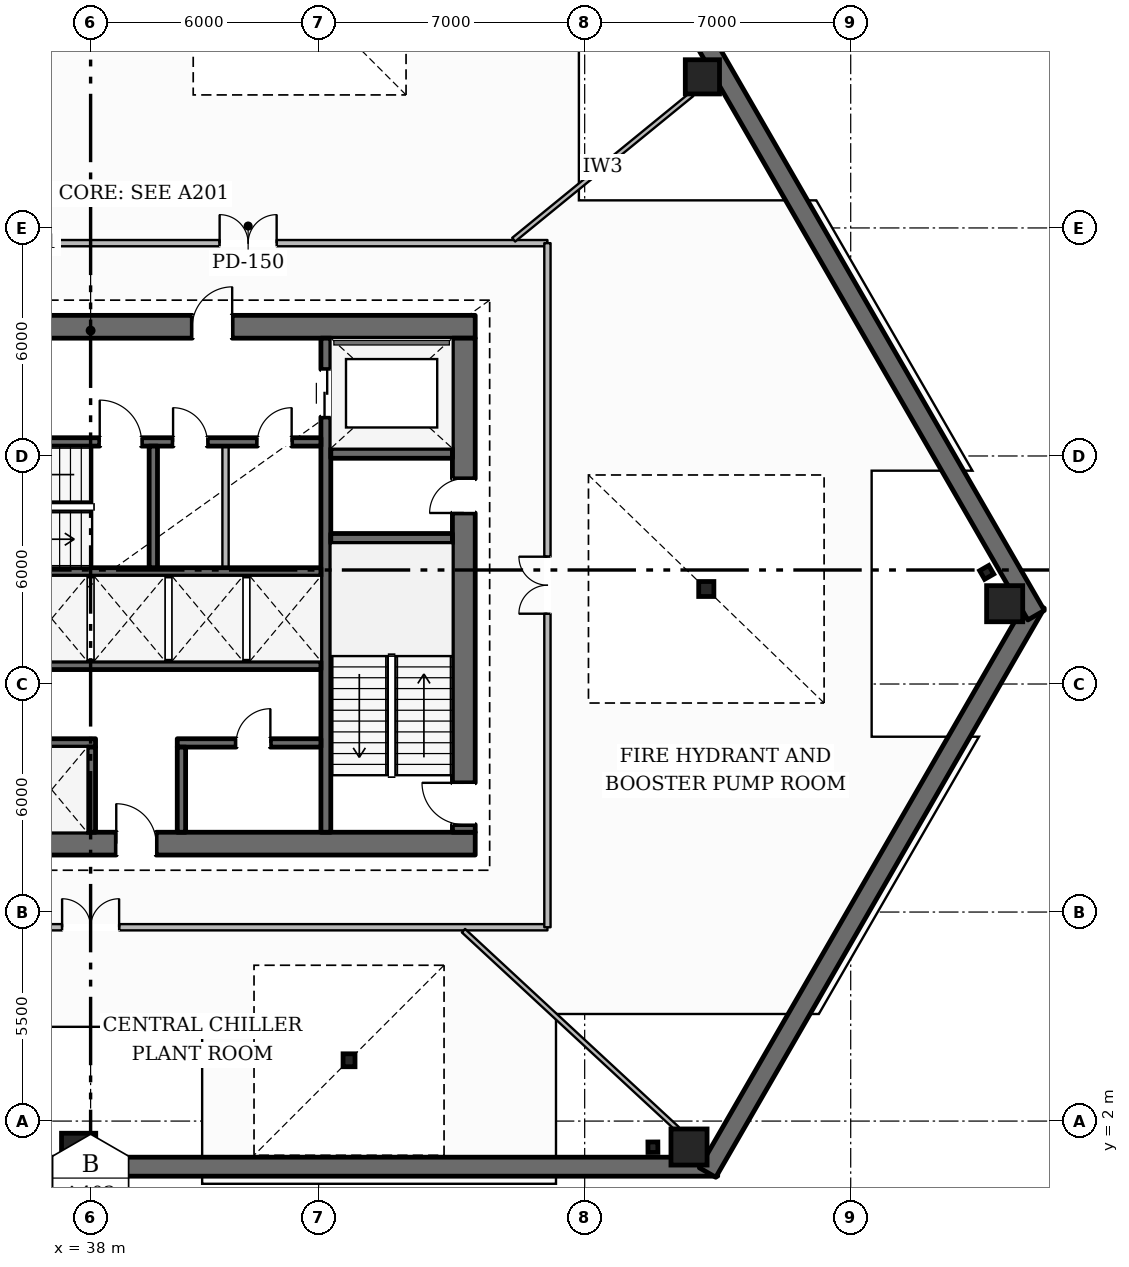
"""IFC4 building model, lengths in metres.
Left out: names, types, materials, properties, quantities, classifications, styles, units other than length and angle.
Written with IfcOpenShell. Run it as: python <this file> out.ifc"""

import sys

from ifc_helpers import new_model, si_unit, direction, frame, frame_2d, origin, origin_2d, place, context, subcontext, project, spatial, rectangle, hollow_rectangle, i_section, extrude, element, fill, save


model = new_model("IFC4")
c1 = context("Model", 3, precision=1e-05, world=origin(), true_north=direction((0.0, 1.0)))
c2 = subcontext(c1, "Body", "Model", "MODEL_VIEW")
j1 = project(units=[si_unit("LENGTHUNIT", "METRE"), si_unit("PLANEANGLEUNIT", "RADIAN")], contexts=[c1])
p1 = place(None, origin())
s1 = spatial("IfcSite", under=j1, at=p1, CompositionType="ELEMENT")
p2 = place(p1, origin())
s2 = spatial("IfcBuilding", under=s1, at=p2, CompositionType="ELEMENT")
p3 = place(p2, frame((0.0, 0.0, -8.4)))
s3 = spatial("IfcBuildingStorey", under=s2, at=p3, CompositionType="ELEMENT", Elevation=-8.4)
p4 = place(p3, frame((21.5, 0.8, 0.0), z_axis=(0.0, 0.0, 1.0), x_axis=(1.0, 0.0, 0.0)))
e1 = element("IfcWall", 1, at=p4, inside=s3, PredefinedType="SHEAR", context=c2, shape_type="SweptSolid", body=[
    extrude(rectangle(XDim=33.0, YDim=0.5, at=frame_2d((16.5, 0.0))), origin(), (0.0, 0.0, 1.0), 3.95),
])
p5 = place(p3, frame((54.233, 0.646, 0.0), z_axis=(0.0, 0.0, 1.0), x_axis=(0.499998305863, 0.866026381893, 0.0)))
e2 = element("IfcWall", 2, at=p5, inside=s3, PredefinedType="SHEAR", context=c2, shape_type="SweptSolid", body=[
    extrude(rectangle(XDim=17.289, YDim=0.5, at=frame_2d((8.644, 0.0))), origin(), (0.0, 0.0, 1.0), 3.95),
])
p6 = place(p3, frame((62.878, 15.311, 0.0), z_axis=(0.0, 0.0, 1.0), x_axis=(-0.499999749417, 0.866025548458, 0.0)))
e3 = element("IfcWall", 3, at=p6, inside=s3, PredefinedType="SHEAR", context=c2, shape_type="SweptSolid", body=[
    extrude(rectangle(XDim=33.0, YDim=0.5, at=frame_2d((16.5, 0.0))), origin(), (0.0, 0.0, 1.0), 3.95),
])
p7 = place(p3, frame((27.88, 9.3, 0.0), z_axis=(0.0, 0.0, 1.0), x_axis=(1.0, 0.0, 0.0)))
e4 = element("IfcWall", 4, at=p7, inside=s3, PredefinedType="SOLIDWALL", context=c2, shape_type="SweptSolid", body=[
    extrude(rectangle(XDim=20.24, YDim=0.6, at=frame_2d((10.12, 0.0))), origin(), (0.0, 0.0, 1.0), 3.95),
])
p8 = place(p7, frame((10.795, 0.0, 0.0)))
e5 = element("IfcOpeningElement", 5, at=p8, cuts=e4, PredefinedType="OPENING", context=c2, shape_type="SweptSolid", body=[
    extrude(rectangle(XDim=1.05, YDim=2.15, at=frame_2d((0.525, 1.075))), frame((0.0, 0.31, 0.0), z_axis=(0.0, -1.0, 0.0), x_axis=(1.0, 0.0, 0.0)), (0.0, 0.0, 1.0), 0.62),
])
p9 = place(p3, frame((27.88, 22.9, 0.0), z_axis=(0.0, 0.0, 1.0), x_axis=(1.0, 0.0, 0.0)))
e6 = element("IfcWall", 6, at=p9, inside=s3, PredefinedType="SOLIDWALL", context=c2, shape_type="SweptSolid", body=[
    extrude(rectangle(XDim=20.24, YDim=0.6, at=frame_2d((10.12, 0.0))), origin(), (0.0, 0.0, 1.0), 3.95),
])
p10 = place(p9, frame((6.395, 0.0, 0.0)))
e7 = element("IfcOpeningElement", 7, at=p10, cuts=e6, PredefinedType="OPENING", context=c2, shape_type="SweptSolid", body=[
    extrude(rectangle(XDim=1.05, YDim=2.15, at=frame_2d((0.525, 1.075))), frame((0.0, 0.31, 0.0), z_axis=(0.0, -1.0, 0.0), x_axis=(1.0, 0.0, 0.0)), (0.0, 0.0, 1.0), 0.62),
])
p11 = place(p9, frame((12.795, 0.0, 0.0)))
e8 = element("IfcOpeningElement", 8, at=p11, cuts=e6, PredefinedType="OPENING", context=c2, shape_type="SweptSolid", body=[
    extrude(rectangle(XDim=1.05, YDim=2.15, at=frame_2d((0.525, 1.075))), frame((0.0, 0.31, 0.0), z_axis=(0.0, -1.0, 0.0), x_axis=(1.0, 0.0, 0.0)), (0.0, 0.0, 1.0), 0.62),
])
p12 = place(p3, frame((47.82, 9.6, 0.0), z_axis=(0.0, 0.0, 1.0), x_axis=(0.0, 1.0, 0.0)))
e9 = element("IfcWall", 9, at=p12, inside=s3, PredefinedType="SOLIDWALL", context=c2, shape_type="SweptSolid", body=[
    extrude(rectangle(XDim=13.0, YDim=0.6, at=frame_2d((6.5, 0.0))), origin(), (0.0, 0.0, 1.0), 3.95),
])
p13 = place(p12, frame((0.2, 0.0, 0.0)))
e10 = element("IfcOpeningElement", 10, at=p13, cuts=e9, PredefinedType="OPENING", context=c2, shape_type="SweptSolid", body=[
    extrude(rectangle(XDim=1.1, YDim=2.15, at=frame_2d((0.55, 1.075))), frame((0.0, 0.31, 0.0), z_axis=(0.0, -1.0, 0.0), x_axis=(1.0, 0.0, 0.0)), (0.0, 0.0, 1.0), 0.62),
])
p14 = place(p12, frame((8.4, 0.0, 0.0)))
e11 = element("IfcOpeningElement", 11, at=p14, cuts=e9, PredefinedType="OPENING", context=c2, shape_type="SweptSolid", body=[
    extrude(rectangle(XDim=0.9, YDim=2.1, at=frame_2d((0.45, 1.05))), frame((0.0, 0.31, 0.0), z_axis=(0.0, -1.0, 0.0), x_axis=(1.0, 0.0, 0.0)), (0.0, 0.0, 1.0), 0.62),
])
p15 = place(p3, frame((44.19, 9.6, 0.0), z_axis=(0.0, 0.0, 1.0), x_axis=(0.0, 1.0, 0.0)))
e12 = element("IfcWall", 12, at=p15, inside=s3, PredefinedType="SHEAR", context=c2, shape_type="SweptSolid", body=[
    extrude(rectangle(XDim=13.0, YDim=0.26, at=frame_2d((6.5, 0.0))), origin(), (0.0, 0.0, 1.0), 3.95),
])
p16 = place(p15, frame((10.925, 0.0, 0.0)))
e13 = element("IfcOpeningElement", 13, at=p16, cuts=e12, PredefinedType="OPENING", context=c2, shape_type="SweptSolid", body=[
    extrude(rectangle(XDim=1.25, YDim=2.25, at=frame_2d((0.625, 1.125))), frame((0.0, 0.14, 0.0), z_axis=(0.0, -1.0, 0.0), x_axis=(1.0, 0.0, 0.0)), (0.0, 0.0, 1.0), 0.28),
])
for number, where, z_axis, x_axis in (
    (14, (44.32, 17.33, 0.0), (0.0, 0.0, 1.0), (1.0, 0.0, 0.0)),
    (15, (44.32, 19.57, 0.0), (0.0, 0.0, 1.0), (1.0, 0.0, 0.0)),
):
    element("IfcWall", number, at=place(p3, frame(where, z_axis=z_axis, x_axis=x_axis)), inside=s3, PredefinedType="SHEAR", context=c2, shape_type="SweptSolid", body=[
        extrude(rectangle(XDim=3.2, YDim=0.26, at=frame_2d((1.6, 0.0))), origin(), (0.0, 0.0, 1.0), 3.95),
    ])
p17 = place(p3, frame((31.94, 19.87, 0.0), z_axis=(0.0, 0.0, 1.0), x_axis=(1.0, 0.0, 0.0)))
e16 = element("IfcWall", 16, at=p17, inside=s3, PredefinedType="SOLIDWALL", context=c2, shape_type="SweptSolid", body=[
    extrude(rectangle(XDim=12.12, YDim=0.22, at=frame_2d((6.06, 0.0))), origin(), (0.0, 0.0, 1.0), 3.95),
])
p18 = place(p17, frame((6.3, 0.0, 0.0)))
e17 = element("IfcOpeningElement", 17, at=p18, cuts=e16, PredefinedType="OPENING", context=c2, shape_type="SweptSolid", body=[
    extrude(rectangle(XDim=1.1, YDim=2.15, at=frame_2d((0.55, 1.075))), frame((0.0, 0.12, 0.0), z_axis=(0.0, -1.0, 0.0), x_axis=(1.0, 0.0, 0.0)), (0.0, 0.0, 1.0), 0.24),
])
p19 = place(p17, frame((8.23, 0.0, 0.0)))
e18 = element("IfcOpeningElement", 18, at=p19, cuts=e16, PredefinedType="OPENING", context=c2, shape_type="SweptSolid", body=[
    extrude(rectangle(XDim=0.9, YDim=2.1, at=frame_2d((0.45, 1.05))), frame((0.0, 0.12, 0.0), z_axis=(0.0, -1.0, 0.0), x_axis=(1.0, 0.0, 0.0)), (0.0, 0.0, 1.0), 0.24),
])
p20 = place(p17, frame((10.45, 0.0, 0.0)))
e19 = element("IfcOpeningElement", 19, at=p20, cuts=e16, PredefinedType="OPENING", context=c2, shape_type="SweptSolid", body=[
    extrude(rectangle(XDim=0.9, YDim=2.1, at=frame_2d((0.45, 1.05))), frame((0.0, 0.12, 0.0), z_axis=(0.0, -1.0, 0.0), x_axis=(1.0, 0.0, 0.0)), (0.0, 0.0, 1.0), 0.24),
])
p21 = place(p3, frame((31.94, 16.45, 0.0), z_axis=(0.0, 0.0, 1.0), x_axis=(1.0, 0.0, 0.0)))
e20 = element("IfcWall", 20, at=p21, inside=s3, PredefinedType="SOLIDWALL", context=c2, shape_type="SweptSolid", body=[
    extrude(rectangle(XDim=12.12, YDim=0.22, at=frame_2d((6.06, 0.0))), origin(), (0.0, 0.0, 1.0), 3.95),
])
p22 = place(p3, frame((39.65, 16.56, 0.0), z_axis=(0.0, 0.0, 1.0), x_axis=(0.0, 1.0, 0.0)))
e21 = element("IfcWall", 21, at=p22, inside=s3, PredefinedType="SOLIDWALL", context=c2, shape_type="SweptSolid", body=[
    extrude(rectangle(XDim=3.2, YDim=0.22, at=frame_2d((1.6, 0.0))), origin(), (0.0, 0.0, 1.0), 3.95),
])
p23 = place(p3, frame((31.94, 13.99, 0.0), z_axis=(0.0, 0.0, 1.0), x_axis=(1.0, 0.0, 0.0)))
e22 = element("IfcWall", 22, at=p23, inside=s3, PredefinedType="SOLIDWALL", context=c2, shape_type="SweptSolid", body=[
    extrude(rectangle(XDim=12.12, YDim=0.22, at=frame_2d((6.06, 0.0))), origin(), (0.0, 0.0, 1.0), 3.95),
])
p24 = place(p23, frame((2.61, 0.0, 0.0)))
e23 = element("IfcOpeningElement", 23, at=p24, cuts=e22, PredefinedType="OPENING", context=c2, shape_type="SweptSolid", body=[
    extrude(rectangle(XDim=0.9, YDim=2.1, at=frame_2d((0.45, 1.05))), frame((0.0, 0.12, 0.0), z_axis=(0.0, -1.0, 0.0), x_axis=(1.0, 0.0, 0.0)), (0.0, 0.0, 1.0), 0.24),
])
p25 = place(p3, frame((31.94, 11.95, 0.0), z_axis=(0.0, 0.0, 1.0), x_axis=(1.0, 0.0, 0.0)))
e24 = element("IfcWall", 24, at=p25, inside=s3, PredefinedType="SOLIDWALL", context=c2, shape_type="SweptSolid", body=[
    extrude(rectangle(XDim=6.19, YDim=0.22, at=frame_2d((3.095, 0.0))), origin(), (0.0, 0.0, 1.0), 3.95),
])
p26 = place(p25, frame((2.51, 0.0, 0.0)))
e25 = element("IfcOpeningElement", 25, at=p26, cuts=e24, PredefinedType="OPENING", context=c2, shape_type="SweptSolid", body=[
    extrude(rectangle(XDim=0.9, YDim=2.1, at=frame_2d((0.45, 1.05))), frame((0.0, 0.12, 0.0), z_axis=(0.0, -1.0, 0.0), x_axis=(1.0, 0.0, 0.0)), (0.0, 0.0, 1.0), 0.24),
])
p27 = place(p3, frame((40.28, 11.95, 0.0), z_axis=(0.0, 0.0, 1.0), x_axis=(1.0, 0.0, 0.0)))
e26 = element("IfcWall", 26, at=p27, inside=s3, PredefinedType="SOLIDWALL", context=c2, shape_type="SweptSolid", body=[
    extrude(rectangle(XDim=3.78, YDim=0.22, at=frame_2d((1.89, 0.0))), origin(), (0.0, 0.0, 1.0), 3.95),
])
p28 = place(p27, frame((1.55, 0.0, 0.0)))
e27 = element("IfcOpeningElement", 27, at=p28, cuts=e26, PredefinedType="OPENING", context=c2, shape_type="SweptSolid", body=[
    extrude(rectangle(XDim=0.9, YDim=2.1, at=frame_2d((0.45, 1.05))), frame((0.0, 0.12, 0.0), z_axis=(0.0, -1.0, 0.0), x_axis=(1.0, 0.0, 0.0)), (0.0, 0.0, 1.0), 0.24),
])
for number, where, z_axis, x_axis in (
    (28, (38.02, 9.6, 0.0), (0.0, 0.0, 1.0), (0.0, 1.0, 0.0)),
    (29, (40.39, 9.6, 0.0), (0.0, 0.0, 1.0), (0.0, 1.0, 0.0)),
):
    element("IfcWall", number, at=place(p3, frame(where, z_axis=z_axis, x_axis=x_axis)), inside=s3, PredefinedType="SOLIDWALL", context=c2, shape_type="SweptSolid", body=[
        extrude(rectangle(XDim=2.24, YDim=0.22, at=frame_2d((1.12, 0.0))), origin(), (0.0, 0.0, 1.0), 3.95),
    ])
for number, where, z_axis, x_axis in (
    (30, (53.746, 1.318, 0.0), (0.0, 0.0, 1.0), (1.0, 0.0, 0.0)),
    (31, (62.051, 15.613, 0.0), (0.0, 0.0, 1.0), (1.0, 0.0, 0.0)),
):
    element("IfcColumn", number, at=place(p3, frame(where, z_axis=z_axis, x_axis=x_axis)), inside=s3, PredefinedType="COLUMN", context=c2, shape_type="SweptSolid", body=[
        extrude(hollow_rectangle(XDim=0.95, YDim=0.95, WallThickness=0.04, at=origin_2d()), origin(), (0.0, 0.0, 1.0), 3.95),
    ])
for number, where, z_axis, x_axis in (
    (32, (37.685, 1.23, 0.0), (0.0, 0.0, 1.0), (1.0, 0.0, 0.0)),
    (33, (54.098, 29.476, 0.0), (0.0, 0.0, 1.0), (1.0, 0.0, 0.0)),
):
    element("IfcColumn", number, at=place(p3, frame(where, z_axis=z_axis, x_axis=x_axis)), inside=s3, PredefinedType="COLUMN", context=c2, shape_type="SweptSolid", body=[
        extrude(hollow_rectangle(XDim=0.9, YDim=0.9, WallThickness=0.038, at=origin_2d()), origin(), (0.0, 0.0, 1.0), 3.95),
    ])
for number, where, z_axis, x_axis in (
    (34, (52.795, 1.312, 0.0), (0.0, 0.0, 1.0), (1.0, 0.005, 0.0)),
    (35, (61.578, 16.437, 0.0), (0.0, 0.0, 1.0), (-0.498, 0.867, 0.0)),
):
    element("IfcColumn", number, at=place(p3, frame(where, z_axis=z_axis, x_axis=x_axis)), inside=s3, PredefinedType="PILASTER", context=c2, shape_type="SweptSolid", body=[
        extrude(i_section(OverallWidth=0.261, OverallDepth=0.276, WebThickness=0.015, FlangeThickness=0.025, at=origin_2d()), origin(), (0.0, 0.0, 1.0), 3.95),
    ])
p29 = place(p3, frame((54.2, 16.0, 0.0), z_axis=(0.0, 0.0, 1.0), x_axis=(1.0, 0.0, 0.0)))
e36 = element("IfcColumn", 36, at=p29, inside=s3, PredefinedType="COLUMN", context=c2, shape_type="SweptSolid", body=[
    extrude(i_section(OverallWidth=0.399, OverallDepth=0.394, WebThickness=0.023, FlangeThickness=0.037, at=origin_2d()), origin(), (0.0, 0.0, 1.0), 3.95),
])
p30 = place(p3, frame((44.8, 3.6, 0.0), z_axis=(0.0, 0.0, 1.0), x_axis=(1.0, 0.0, 0.0)))
e37 = element("IfcColumn", 37, at=p30, inside=s3, PredefinedType="COLUMN", context=c2, shape_type="SweptSolid", body=[
    extrude(i_section(OverallWidth=0.314, OverallDepth=0.34, WebThickness=0.019, FlangeThickness=0.031, at=origin_2d()), origin(), (0.0, 0.0, 1.0), 3.95),
])
p31 = place(p3, frame((41.55, 16.56, 0.0), z_axis=(0.0, 0.0, 1.0), x_axis=(0.0, 1.0, 0.0)))
e38 = element("IfcWall", 38, at=p31, inside=s3, PredefinedType="PARTITIONING", context=c2, shape_type="SweptSolid", body=[
    extrude(rectangle(XDim=3.2, YDim=0.165, at=frame_2d((1.6, 0.0))), origin(), (0.0, 0.0, 1.0), 3.95),
])
p32 = place(p3, frame((25.98, 25.1, 0.0), z_axis=(0.0, 0.0, 1.0), x_axis=(1.0, 0.0, 0.0)))
e39 = element("IfcWall", 39, at=p32, inside=s3, PredefinedType="PARTITIONING", context=c2, shape_type="SweptSolid", body=[
    extrude(rectangle(XDim=24.04, YDim=0.165, at=frame_2d((12.02, 0.0))), origin(), (0.0, 0.0, 1.0), 3.95),
])
p33 = place(p32, frame((15.415, 0.0, 0.0)))
e40 = element("IfcOpeningElement", 40, at=p33, cuts=e39, PredefinedType="OPENING", context=c2, shape_type="SweptSolid", body=[
    extrude(rectangle(XDim=1.5, YDim=2.25, at=frame_2d((0.75, 1.125))), frame((0.0, 0.093, 0.0), z_axis=(0.0, -1.0, 0.0), x_axis=(1.0, 0.0, 0.0)), (0.0, 0.0, 1.0), 0.185),
])
p34 = place(p32, frame((4.374, 0.0, 0.0)))
e41 = element("IfcOpeningElement", 41, at=p34, cuts=e39, PredefinedType="OPENING", context=c2, shape_type="SweptSolid", body=[
    extrude(rectangle(XDim=1.5, YDim=2.25, at=frame_2d((0.75, 1.125))), frame((0.0, 0.093, 0.0), z_axis=(0.0, -1.0, 0.0), x_axis=(1.0, 0.0, 0.0)), (0.0, 0.0, 1.0), 0.185),
])
p35 = place(p3, frame((25.98, 7.1, 0.0), z_axis=(0.0, 0.0, 1.0), x_axis=(1.0, 0.0, 0.0)))
e42 = element("IfcWall", 42, at=p35, inside=s3, PredefinedType="PARTITIONING", context=c2, shape_type="SweptSolid", body=[
    extrude(rectangle(XDim=24.04, YDim=0.165, at=frame_2d((12.02, 0.0))), origin(), (0.0, 0.0, 1.0), 3.95),
])
p36 = place(p35, frame((11.27, 0.0, 0.0)))
e43 = element("IfcOpeningElement", 43, at=p36, cuts=e42, PredefinedType="OPENING", context=c2, shape_type="SweptSolid", body=[
    extrude(rectangle(XDim=1.5, YDim=2.25, at=frame_2d((0.75, 1.125))), frame((0.0, 0.093, 0.0), z_axis=(0.0, -1.0, 0.0), x_axis=(1.0, 0.0, 0.0)), (0.0, 0.0, 1.0), 0.185),
])
p37 = place(p3, frame((50.02, 7.1, 0.0), z_axis=(0.0, 0.0, 1.0), x_axis=(0.0, 1.0, 0.0)))
e44 = element("IfcWall", 44, at=p37, inside=s3, PredefinedType="PARTITIONING", context=c2, shape_type="SweptSolid", body=[
    extrude(rectangle(XDim=18.0, YDim=0.165, at=frame_2d((9.0, 0.0))), origin(), (0.0, 0.0, 1.0), 3.638),
])
p38 = place(p37, frame((8.25, 0.0, 0.0)))
e45 = element("IfcOpeningElement", 45, at=p38, cuts=e44, PredefinedType="OPENING", context=c2, shape_type="SweptSolid", body=[
    extrude(rectangle(XDim=1.5, YDim=2.25, at=frame_2d((0.75, 1.125))), frame((0.0, 0.093, 0.0), z_axis=(0.0, -1.0, 0.0), x_axis=(1.0, 0.0, 0.0)), (0.0, 0.0, 1.0), 0.185),
])
p39 = place(p3, frame((49.132, 25.19, 0.0), z_axis=(0.0, 0.0, 1.0), x_axis=(0.774559140632, 0.632501492222, 0.0)))
e46 = element("IfcWall", 46, at=p39, inside=s3, PredefinedType="PARTITIONING", context=c2, shape_type="SweptSolid", body=[
    extrude(rectangle(XDim=6.051, YDim=0.125, at=frame_2d((3.026, 0.0))), origin(), (0.0, 0.0, 1.0), 3.417),
])
p40 = place(p3, frame((47.811, 7.01, 0.0), z_axis=(0.0, 0.0, 1.0), x_axis=(0.733527128647, -0.679660173571, 0.0)))
e47 = element("IfcWall", 47, at=p40, inside=s3, PredefinedType="PARTITIONING", context=c2, shape_type="SweptSolid", body=[
    extrude(rectangle(XDim=7.664, YDim=0.125, at=frame_2d((3.832, 0.0))), origin(), (0.0, 0.0, 1.0), 3.417),
])
p41 = place(p13, origin())
e48 = element("IfcDoor", 48, at=p41, inside=s3, OperationType="SINGLE_SWING_RIGHT", PredefinedType="DOOR", context=c2, shape_type="SweptSolid", body=[
    extrude(rectangle(XDim=1.1, YDim=2.15, at=frame_2d((0.55, 1.075))), frame((0.0, 0.025, 0.0), z_axis=(0.0, -1.0, 0.0), x_axis=(1.0, 0.0, 0.0)), (0.0, 0.0, 1.0), 0.05),
])
fill(e10, e48)
p42 = place(p18, origin())
e49 = element("IfcDoor", 49, at=p42, inside=s3, OperationType="SINGLE_SWING_LEFT", PredefinedType="DOOR", context=c2, shape_type="SweptSolid", body=[
    extrude(rectangle(XDim=1.1, YDim=2.15, at=frame_2d((0.55, 1.075))), frame((0.0, 0.025, 0.0), z_axis=(0.0, -1.0, 0.0), x_axis=(1.0, 0.0, 0.0)), (0.0, 0.0, 1.0), 0.05),
])
fill(e17, e49)
p43 = place(p14, origin())
e50 = element("IfcDoor", 50, at=p43, inside=s3, OperationType="SINGLE_SWING_LEFT", PredefinedType="DOOR", context=c2, shape_type="SweptSolid", body=[
    extrude(rectangle(XDim=0.9, YDim=2.1, at=frame_2d((0.45, 1.05))), frame((0.0, 0.025, 0.0), z_axis=(0.0, -1.0, 0.0), x_axis=(1.0, 0.0, 0.0)), (0.0, 0.0, 1.0), 0.05),
])
fill(e11, e50)
p44 = place(p11, origin())
e51 = element("IfcDoor", 51, at=p44, inside=s3, OperationType="SINGLE_SWING_RIGHT", PredefinedType="DOOR", context=c2, shape_type="SweptSolid", body=[
    extrude(rectangle(XDim=1.05, YDim=2.15, at=frame_2d((0.525, 1.075))), frame((0.0, 0.025, 0.0), z_axis=(0.0, -1.0, 0.0), x_axis=(1.0, 0.0, 0.0)), (0.0, 0.0, 1.0), 0.05),
])
fill(e8, e51)
p45 = place(p16, origin())
e52 = element("IfcDoor", 52, at=p45, inside=s3, OperationType="DOUBLE_DOOR_SLIDING", PredefinedType="DOOR", context=c2, shape_type="SweptSolid", body=[
    extrude(rectangle(XDim=1.25, YDim=2.25, at=frame_2d((0.625, 1.125))), frame((0.0, 0.025, 0.0), z_axis=(0.0, -1.0, 0.0), x_axis=(1.0, 0.0, 0.0)), (0.0, 0.0, 1.0), 0.05),
])
fill(e13, e52)
p46 = place(p8, origin())
e53 = element("IfcDoor", 53, at=p46, inside=s3, OperationType="SINGLE_SWING_LEFT", PredefinedType="DOOR", context=c2, shape_type="SweptSolid", body=[
    extrude(rectangle(XDim=1.05, YDim=2.15, at=frame_2d((0.525, 1.075))), frame((0.0, 0.025, 0.0), z_axis=(0.0, -1.0, 0.0), x_axis=(1.0, 0.0, 0.0)), (0.0, 0.0, 1.0), 0.05),
])
fill(e5, e53)
p47 = place(p19, origin())
e54 = element("IfcDoor", 54, at=p47, inside=s3, OperationType="SINGLE_SWING_LEFT", PredefinedType="DOOR", context=c2, shape_type="SweptSolid", body=[
    extrude(rectangle(XDim=0.9, YDim=2.1, at=frame_2d((0.45, 1.05))), frame((0.0, 0.025, 0.0), z_axis=(0.0, -1.0, 0.0), x_axis=(1.0, 0.0, 0.0)), (0.0, 0.0, 1.0), 0.05),
])
fill(e18, e54)
p48 = place(p20, origin())
e55 = element("IfcDoor", 55, at=p48, inside=s3, OperationType="SINGLE_SWING_RIGHT", PredefinedType="DOOR", context=c2, shape_type="SweptSolid", body=[
    extrude(rectangle(XDim=0.9, YDim=2.1, at=frame_2d((0.45, 1.05))), frame((0.0, 0.025, 0.0), z_axis=(0.0, -1.0, 0.0), x_axis=(1.0, 0.0, 0.0)), (0.0, 0.0, 1.0), 0.05),
])
fill(e19, e55)
p49 = place(p28, origin())
e56 = element("IfcDoor", 56, at=p49, inside=s3, OperationType="SINGLE_SWING_RIGHT", PredefinedType="DOOR", context=c2, shape_type="SweptSolid", body=[
    extrude(rectangle(XDim=0.9, YDim=2.1, at=frame_2d((0.45, 1.05))), frame((0.0, 0.025, 0.0), z_axis=(0.0, -1.0, 0.0), x_axis=(1.0, 0.0, 0.0)), (0.0, 0.0, 1.0), 0.05),
])
fill(e27, e56)
p50 = place(p33, origin())
e57 = element("IfcDoor", 57, at=p50, inside=s3, OperationType="DOUBLE_DOOR_SINGLE_SWING", PredefinedType="DOOR", context=c2, shape_type="SweptSolid", body=[
    extrude(rectangle(XDim=1.5, YDim=2.25, at=frame_2d((0.75, 1.125))), frame((0.0, 0.025, 0.0), z_axis=(0.0, -1.0, 0.0), x_axis=(1.0, 0.0, 0.0)), (0.0, 0.0, 1.0), 0.05),
])
fill(e40, e57)
p51 = place(p36, origin())
e58 = element("IfcDoor", 58, at=p51, inside=s3, OperationType="DOUBLE_DOOR_SINGLE_SWING", PredefinedType="DOOR", context=c2, shape_type="SweptSolid", body=[
    extrude(rectangle(XDim=1.5, YDim=2.25, at=frame_2d((0.75, 1.125))), frame((0.0, 0.025, 0.0), z_axis=(0.0, -1.0, 0.0), x_axis=(1.0, 0.0, 0.0)), (0.0, 0.0, 1.0), 0.05),
])
fill(e43, e58)
p52 = place(p38, origin())
e59 = element("IfcDoor", 59, at=p52, inside=s3, OperationType="DOUBLE_DOOR_SINGLE_SWING", PredefinedType="DOOR", context=c2, shape_type="SweptSolid", body=[
    extrude(rectangle(XDim=1.5, YDim=2.25, at=frame_2d((0.75, 1.125))), frame((0.0, 0.025, 0.0), z_axis=(0.0, -1.0, 0.0), x_axis=(1.0, 0.0, 0.0)), (0.0, 0.0, 1.0), 0.05),
])
fill(e45, e59)
save(model, sys.argv[1])
